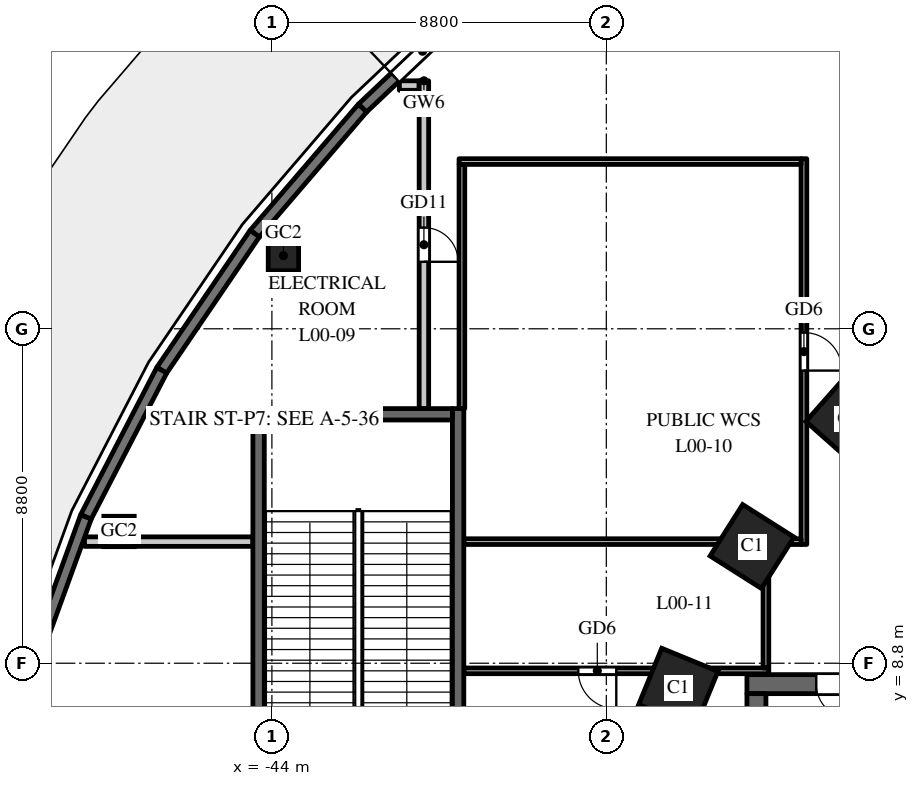
"""IFC4 building model, lengths in metres.
Left out: names, types, materials, properties, quantities, classifications, styles, units other than length and angle.
Written with IfcOpenShell. Run it as: python <this file> out.ifc"""

import sys

from ifc_helpers import new_model, si_unit, direction, frame, frame_2d, origin, origin_2d, place, context, subcontext, project, spatial, rectangle, hollow_rectangle, extrude, element, fill, save


model = new_model("IFC4")
c1 = context("Model", 3, precision=1e-05, world=origin(), true_north=direction((0.0, 1.0)))
c2 = subcontext(c1, "Body", "Model", "MODEL_VIEW")
j1 = project(units=[si_unit("LENGTHUNIT", "METRE"), si_unit("PLANEANGLEUNIT", "RADIAN")], contexts=[c1])
p1 = place(None, origin())
s1 = spatial("IfcSite", under=j1, at=p1, CompositionType="ELEMENT")
p2 = place(p1, origin())
s2 = spatial("IfcBuilding", under=s1, at=p2, CompositionType="ELEMENT")
p3 = place(p2, origin())
s3 = spatial("IfcBuildingStorey", under=s2, at=p3, CompositionType="ELEMENT", Elevation=0.0)
for number, where, z_axis, x_axis in (
    (1, (-28.819, 15.23, 0.0), (0.0, 0.0, 1.0), (-0.663, -0.749, 0.0)),
    (2, (-31.365, 11.871, 0.0), (0.0, 0.0, 1.0), (-0.535, -0.845, 0.0)),
    (3, (-33.305, 8.149, 0.0), (0.0, 0.0, 1.0), (-0.379, -0.925, 0.0)),
):
    element("IfcColumn", number, at=place(p3, frame(where, z_axis=z_axis, x_axis=x_axis)), inside=s3, PredefinedType="COLUMN", context=c2, shape_type="SweptSolid", body=[
        extrude(rectangle(XDim=1.6, YDim=1.6, at=origin_2d()), origin(), (0.0, 0.0, 1.0), 7.5),
    ])
p4 = place(p3, frame((-16.5, 8.25, 0.0), z_axis=(0.0, 0.0, 1.0), x_axis=(-1.0, 0.0, 0.0)))
e4 = element("IfcWall", 4, at=p4, inside=s3, PredefinedType="SHEAR", context=c2, shape_type="SweptSolid", body=[
    extrude(rectangle(XDim=15.0, YDim=0.5, at=frame_2d((7.5, 0.0))), origin(), (0.0, 0.0, 1.0), 7.25),
])
p5 = place(p4, frame((6.9, 0.0, 0.0)))
e5 = element("IfcOpeningElement", 5, at=p5, cuts=e4, PredefinedType="OPENING", context=c2, shape_type="SweptSolid", body=[
    extrude(rectangle(XDim=1.2, YDim=2.1, at=frame_2d((0.6, 1.05))), frame((0.0, 0.26, 0.0), z_axis=(0.0, -1.0, 0.0), x_axis=(1.0, 0.0, 0.0)), (0.0, 0.0, 1.0), 0.52),
])
p6 = place(p4, frame((5.3, 0.0, 0.0)))
e6 = element("IfcOpeningElement", 6, at=p6, cuts=e4, PredefinedType="OPENING", context=c2, shape_type="SweptSolid", body=[
    extrude(rectangle(XDim=1.1, YDim=2.1, at=frame_2d((0.55, 1.05))), frame((0.0, 0.26, 0.0), z_axis=(0.0, -1.0, 0.0), x_axis=(1.0, 0.0, 0.0)), (0.0, 0.0, 1.0), 0.52),
])
p7 = place(p4, frame((12.275, 0.0, 0.0)))
e7 = element("IfcOpeningElement", 7, at=p7, cuts=e4, PredefinedType="OPENING", context=c2, shape_type="SweptSolid", body=[
    extrude(rectangle(XDim=0.9, YDim=2.1, at=frame_2d((0.45, 1.05))), frame((0.0, 0.26, 0.0), z_axis=(0.0, -1.0, 0.0), x_axis=(1.0, 0.0, 0.0)), (0.0, 0.0, 1.0), 0.52),
])
p8 = place(p3, frame((-31.25, -8.0, 0.0), z_axis=(0.0, 0.0, 1.0), x_axis=(0.0, 1.0, 0.0)))
e8 = element("IfcWall", 8, at=p8, inside=s3, PredefinedType="SHEAR", context=c2, shape_type="SweptSolid", body=[
    extrude(rectangle(XDim=16.0, YDim=0.5, at=frame_2d((8.0, 0.0))), origin(), (0.0, 0.0, 1.0), 7.25),
])
for number, where, z_axis, x_axis in (
    (9, (-43.696, 19.525, 0.0), (0.0, 0.0, 1.0), (1.0, 0.0, 0.0)),
    (10, (-48.022, 12.267, 0.0), (0.0, 0.0, 1.0), (1.0, 0.0, 0.0)),
):
    element("IfcColumn", number, at=place(p3, frame(where, z_axis=z_axis, x_axis=x_axis)), inside=s3, PredefinedType="COLUMN", context=c2, shape_type="SweptSolid", body=[
        extrude(hollow_rectangle(XDim=0.8, YDim=0.8, WallThickness=0.04, at=origin_2d()), origin(), (0.0, 0.0, 1.0), 7.5),
    ])
p9 = place(p3, frame((-48.93, 12.0, 0.0), z_axis=(0.0, 0.0, 1.0), x_axis=(1.0, 0.0, 0.0)))
e11 = element("IfcWall", 11, at=p9, inside=s3, PredefinedType="PARTITIONING", context=c2, shape_type="SweptSolid", body=[
    extrude(rectangle(XDim=4.43, YDim=0.25, at=frame_2d((2.215, 0.0))), origin(), (0.0, 0.0, 1.0), 6.65),
])
p10 = place(p3, frame((-40.646, 24.0, 0.0), z_axis=(0.0, 0.0, 1.0), x_axis=(1.0, 0.0, 0.0)))
e12 = element("IfcWall", 12, at=p10, inside=s3, PredefinedType="PARTITIONING", context=c2, shape_type="SweptSolid", body=[
    extrude(rectangle(XDim=0.521, YDim=0.25, at=frame_2d((0.26, 0.0))), origin(), (0.0, 0.0, 1.0), 7.25),
])
p11 = place(p3, frame((-40.0, 24.125, 0.0), z_axis=(0.0, 0.0, 1.0), x_axis=(0.0, -1.0, 0.0)))
e13 = element("IfcWall", 13, at=p11, inside=s3, PredefinedType="PARTITIONING", context=c2, shape_type="SweptSolid", body=[
    extrude(rectangle(XDim=8.625, YDim=0.25, at=frame_2d((4.312, 0.0))), origin(), (0.0, 0.0, 1.0), 6.25),
])
p12 = place(p11, frame((3.863, 0.0, 0.0)))
e14 = element("IfcOpeningElement", 14, at=p12, cuts=e13, PredefinedType="OPENING", context=c2, shape_type="SweptSolid", body=[
    extrude(rectangle(XDim=0.9, YDim=2.1, at=frame_2d((0.45, 1.05))), frame((0.0, 0.135, 0.0), z_axis=(0.0, -1.0, 0.0), x_axis=(1.0, 0.0, 0.0)), (0.0, 0.0, 1.0), 0.27),
])
p13 = place(p3, frame((-31.065, 12.0, 0.0), z_axis=(0.0, 0.0, 1.0), x_axis=(-1.0, 0.0, 0.0)))
e15 = element("IfcWall", 15, at=p13, inside=s3, PredefinedType="PARTITIONING", context=c2, shape_type="SweptSolid", body=[
    extrude(rectangle(XDim=7.885, YDim=0.15, at=frame_2d((3.942, 0.0))), origin(), (0.0, 0.0, 1.0), 7.25),
])
p14 = place(p3, frame((-30.0, 22.075, 0.0), z_axis=(0.0, 0.0, 1.0), x_axis=(0.0, -1.0, 0.0)))
e16 = element("IfcWall", 16, at=p14, inside=s3, PredefinedType="PARTITIONING", context=c2, shape_type="SweptSolid", body=[
    extrude(rectangle(XDim=10.15, YDim=0.15, at=frame_2d((5.075, 0.0))), origin(), (0.0, 0.0, 1.0), 6.25),
])
p15 = place(p14, frame((4.575, 0.0, 0.0)))
e17 = element("IfcOpeningElement", 17, at=p15, cuts=e16, PredefinedType="OPENING", context=c2, shape_type="SweptSolid", body=[
    extrude(rectangle(XDim=1.0, YDim=2.1, at=frame_2d((0.5, 1.05))), frame((0.0, 0.085, 0.0), z_axis=(0.0, -1.0, 0.0), x_axis=(1.0, 0.0, 0.0)), (0.0, 0.0, 1.0), 0.17),
])
p16 = place(p3, frame((-30.075, 12.0, 0.0), z_axis=(0.0, 0.0, 1.0), x_axis=(-1.0, 0.0, 0.0)))
e18 = element("IfcWall", 18, at=p16, inside=s3, PredefinedType="PARTITIONING", context=c2, shape_type="SweptSolid", body=[
    extrude(rectangle(XDim=0.86, YDim=0.15, at=frame_2d((0.43, 0.0))), origin(), (0.0, 0.0, 1.0), 7.25),
])
p17 = place(p3, frame((-39.0, 15.5, 0.0), z_axis=(0.0, 0.0, 1.0), x_axis=(0.0, 1.0, 0.0)))
e19 = element("IfcWall", 19, at=p17, inside=s3, PredefinedType="PARTITIONING", context=c2, shape_type="SweptSolid", body=[
    extrude(rectangle(XDim=6.425, YDim=0.15, at=frame_2d((3.212, 0.0))), origin(), (0.0, 0.0, 1.0), 6.25),
])
p18 = place(p3, frame((-39.075, 22.0, 0.0), z_axis=(0.0, 0.0, 1.0), x_axis=(1.0, 0.0, 0.0)))
e20 = element("IfcWall", 20, at=p18, inside=s3, PredefinedType="PARTITIONING", context=c2, shape_type="SweptSolid", body=[
    extrude(rectangle(XDim=9.0, YDim=0.15, at=frame_2d((4.5, 0.0))), origin(), (0.0, 0.0, 1.0), 6.25),
])
p19 = place(p3, frame((-30.925, 8.6, 0.0), z_axis=(0.0, 0.0, 1.0), x_axis=(-1.0, 0.0, 0.0)))
e21 = element("IfcWall", 21, at=p19, inside=s3, PredefinedType="PARTITIONING", context=c2, shape_type="SweptSolid", body=[
    extrude(rectangle(XDim=8.025, YDim=0.15, at=frame_2d((4.012, 0.0))), origin(), (0.0, 0.0, 1.0), 6.35),
])
p20 = place(p19, frame((4.012, 0.0, 0.0)))
e22 = element("IfcOpeningElement", 22, at=p20, cuts=e21, PredefinedType="OPENING", context=c2, shape_type="SweptSolid", body=[
    extrude(rectangle(XDim=1.0, YDim=2.1, at=frame_2d((0.5, 1.05))), frame((0.0, 0.085, 0.0), z_axis=(0.0, -1.0, 0.0), x_axis=(1.0, 0.0, 0.0)), (0.0, 0.0, 1.0), 0.17),
])
p21 = place(p3, frame((-31.0, 11.925, 0.0), z_axis=(0.0, 0.0, 1.0), x_axis=(0.0, -1.0, 0.0)))
e23 = element("IfcWall", 23, at=p21, inside=s3, PredefinedType="PARTITIONING", context=c2, shape_type="SweptSolid", body=[
    extrude(rectangle(XDim=3.25, YDim=0.15, at=frame_2d((1.625, 0.0))), origin(), (0.0, 0.0, 1.0), 7.25),
])
p22 = place(p3, frame((-38.453, 26.401, 0.0), z_axis=(0.0, 0.0, 1.0), x_axis=(-0.72620446032, -0.687478786444, 0.0)))
e24 = element("IfcWall", 24, at=p22, inside=s3, PredefinedType="SOLIDWALL", context=c2, shape_type="SweptSolid", body=[
    extrude(rectangle(XDim=4.356, YDim=0.3, at=frame_2d((2.178, 0.0))), origin(), (0.0, 0.0, 1.0), 7.25),
])
p23 = place(p22, frame((1.178, 0.0, 0.0)))
e25 = element("IfcOpeningElement", 25, at=p23, cuts=e24, PredefinedType="OPENING", context=c2, shape_type="SweptSolid", body=[
    extrude(rectangle(XDim=2.0, YDim=2.4, at=frame_2d((1.0, 1.2))), frame((0.0, 0.16, 0.0), z_axis=(0.0, -1.0, 0.0), x_axis=(1.0, 0.0, 0.0)), (0.0, 0.0, 1.0), 0.32),
])
p24 = place(p3, frame((-41.617, 23.406, 0.0), z_axis=(0.0, 0.0, 1.0), x_axis=(-0.651387059497, -0.758745608699, 0.0)))
e26 = element("IfcWall", 26, at=p24, inside=s3, PredefinedType="SOLIDWALL", context=c2, shape_type="SweptSolid", body=[
    extrude(rectangle(XDim=4.353, YDim=0.3, at=frame_2d((2.176, 0.0))), origin(), (0.0, 0.0, 1.0), 7.25),
])
p25 = place(p24, frame((0.676, 0.0, 0.0)))
e27 = element("IfcOpeningElement", 27, at=p25, cuts=e26, PredefinedType="OPENING", context=c2, shape_type="SweptSolid", body=[
    extrude(rectangle(XDim=3.0, YDim=3.6, at=frame_2d((1.5, 1.8))), frame((0.0, 0.16, 0.0), z_axis=(0.0, -1.0, 0.0), x_axis=(1.0, 0.0, 0.0)), (0.0, 0.0, 1.0), 0.32),
])
p26 = place(p3, frame((-44.452, 20.104, 0.0), z_axis=(0.0, 0.0, 1.0), x_axis=(-0.562667738859, -0.82668314102, 0.0)))
e28 = element("IfcWall", 28, at=p26, inside=s3, PredefinedType="SOLIDWALL", context=c2, shape_type="SweptSolid", body=[
    extrude(rectangle(XDim=4.349, YDim=0.3, at=frame_2d((2.174, 0.0))), origin(), (0.0, 0.0, 1.0), 7.25),
])
p27 = place(p26, frame((0.674, 0.0, 0.0)))
e29 = element("IfcOpeningElement", 29, at=p27, cuts=e28, PredefinedType="OPENING", context=c2, shape_type="SweptSolid", body=[
    extrude(rectangle(XDim=3.0, YDim=3.6, at=frame_2d((1.5, 1.8))), frame((0.0, 0.16, 0.0), z_axis=(0.0, -1.0, 0.0), x_axis=(1.0, 0.0, 0.0)), (0.0, 0.0, 1.0), 0.32),
])
p28 = place(p3, frame((-46.899, 16.508, 0.0), z_axis=(0.0, 0.0, 1.0), x_axis=(-0.459242531468, -0.888310923771, 0.0)))
e30 = element("IfcWall", 30, at=p28, inside=s3, PredefinedType="SOLIDWALL", context=c2, shape_type="SweptSolid", body=[
    extrude(rectangle(XDim=4.345, YDim=0.3, at=frame_2d((2.172, 0.0))), origin(), (0.0, 0.0, 1.0), 7.25),
])
p29 = place(p28, frame((0.673, 0.0, 0.0)))
e31 = element("IfcOpeningElement", 31, at=p29, cuts=e30, PredefinedType="OPENING", context=c2, shape_type="SweptSolid", body=[
    extrude(rectangle(XDim=3.0, YDim=3.6, at=frame_2d((1.5, 1.8))), frame((0.0, 0.16, 0.0), z_axis=(0.0, -1.0, 0.0), x_axis=(1.0, 0.0, 0.0)), (0.0, 0.0, 1.0), 0.32),
])
p30 = place(p3, frame((-48.894, 12.649, 0.0), z_axis=(0.0, 0.0, 1.0), x_axis=(-0.341286990045, -0.939959142956, 0.0)))
e32 = element("IfcWall", 32, at=p30, inside=s3, PredefinedType="SOLIDWALL", context=c2, shape_type="SweptSolid", body=[
    extrude(rectangle(XDim=4.342, YDim=0.3, at=frame_2d((2.171, 0.0))), origin(), (0.0, 0.0, 1.0), 7.25),
])
p31 = place(p30, frame((0.851, 0.0, 0.0)))
e33 = element("IfcOpeningElement", 33, at=p31, cuts=e32, PredefinedType="OPENING", context=c2, shape_type="SweptSolid", body=[
    extrude(rectangle(XDim=3.0, YDim=3.6, at=frame_2d((1.5, 1.8))), frame((0.0, 0.16, 0.0), z_axis=(0.0, -1.0, 0.0), x_axis=(1.0, 0.0, 0.0)), (0.0, 0.0, 1.0), 0.32),
])
for number, where, z_axis, x_axis in (
    (34, (-44.35, 4.5, 0.0), (0.0, 0.0, 1.0), (0.0, 1.0, 0.0)),
    (35, (-39.1, 4.5, 0.0), (0.0, 0.0, 1.0), (0.0, 1.0, 0.0)),
):
    element("IfcWall", number, at=place(p3, frame(where, z_axis=z_axis, x_axis=x_axis)), inside=s3, PredefinedType="SHEAR", context=c2, shape_type="SweptSolid", body=[
        extrude(rectangle(XDim=11.0, YDim=0.3, at=frame_2d((5.5, 0.0))), origin(), (0.0, 0.0, 1.0), 7.25),
    ])
p32 = place(p3, frame((-44.2, 15.35, 0.0), z_axis=(0.0, 0.0, 1.0), x_axis=(1.0, 0.0, 0.0)))
e36 = element("IfcWall", 36, at=p32, inside=s3, PredefinedType="SHEAR", context=c2, shape_type="SweptSolid", body=[
    extrude(rectangle(XDim=4.95, YDim=0.3, at=frame_2d((2.475, 0.0))), origin(), (0.0, 0.0, 1.0), 7.25),
])
p33 = place(p7, origin())
e37 = element("IfcDoor", 37, at=p33, inside=s3, OperationType="SINGLE_SWING_RIGHT", PredefinedType="DOOR", context=c2, shape_type="SweptSolid", body=[
    extrude(rectangle(XDim=0.9, YDim=2.1, at=frame_2d((0.45, 1.05))), frame((0.0, 0.025, 0.0), z_axis=(0.0, -1.0, 0.0), x_axis=(1.0, 0.0, 0.0)), (0.0, 0.0, 1.0), 0.05),
])
fill(e7, e37)
p34 = place(p12, origin())
e38 = element("IfcDoor", 38, at=p34, inside=s3, OperationType="SINGLE_SWING_RIGHT", PredefinedType="DOOR", context=c2, shape_type="SweptSolid", body=[
    extrude(rectangle(XDim=0.9, YDim=2.1, at=frame_2d((0.45, 1.05))), frame((0.0, 0.025, 0.0), z_axis=(0.0, -1.0, 0.0), x_axis=(1.0, 0.0, 0.0)), (0.0, 0.0, 1.0), 0.05),
])
fill(e14, e38)
p35 = place(p15, origin())
e39 = element("IfcDoor", 39, at=p35, inside=s3, OperationType="SINGLE_SWING_RIGHT", PredefinedType="DOOR", context=c2, shape_type="SweptSolid", body=[
    extrude(rectangle(XDim=1.0, YDim=2.1, at=frame_2d((0.5, 1.05))), frame((0.0, 0.025, 0.0), z_axis=(0.0, -1.0, 0.0), x_axis=(1.0, 0.0, 0.0)), (0.0, 0.0, 1.0), 0.05),
])
fill(e17, e39)
p36 = place(p20, origin())
e40 = element("IfcDoor", 40, at=p36, inside=s3, OperationType="SINGLE_SWING_LEFT", PredefinedType="DOOR", context=c2, shape_type="SweptSolid", body=[
    extrude(rectangle(XDim=1.0, YDim=2.1, at=frame_2d((0.5, 1.05))), frame((0.0, 0.025, 0.0), z_axis=(0.0, -1.0, 0.0), x_axis=(1.0, 0.0, 0.0)), (0.0, 0.0, 1.0), 0.05),
])
fill(e22, e40)
p37 = place(p23, frame((2.0, 0.0, 0.0), z_axis=(0.0, 0.0, 1.0), x_axis=(-1.0, 0.0, 0.0)))
e41 = element("IfcDoor", 41, at=p37, inside=s3, OperationType="DOUBLE_DOOR_SINGLE_SWING", PredefinedType="DOOR", context=c2, shape_type="SweptSolid", body=[
    extrude(rectangle(XDim=2.0, YDim=2.4, at=frame_2d((1.0, 1.2))), frame((0.0, 0.025, 0.0), z_axis=(0.0, -1.0, 0.0), x_axis=(1.0, 0.0, 0.0)), (0.0, 0.0, 1.0), 0.05),
])
fill(e25, e41)
p38 = place(p25, origin())
e42 = element("IfcWindow", 42, at=p38, inside=s3, PartitioningType="SINGLE_PANEL", PredefinedType="WINDOW", context=c2, shape_type="SweptSolid", body=[
    extrude(rectangle(XDim=3.0, YDim=3.6, at=frame_2d((1.5, 1.8))), frame((0.0, 0.03, 0.0), z_axis=(0.0, -1.0, 0.0), x_axis=(1.0, 0.0, 0.0)), (0.0, 0.0, 1.0), 0.06),
])
fill(e27, e42)
p39 = place(p27, origin())
e43 = element("IfcWindow", 43, at=p39, inside=s3, PartitioningType="SINGLE_PANEL", PredefinedType="WINDOW", context=c2, shape_type="SweptSolid", body=[
    extrude(rectangle(XDim=3.0, YDim=3.6, at=frame_2d((1.5, 1.8))), frame((0.0, 0.03, 0.0), z_axis=(0.0, -1.0, 0.0), x_axis=(1.0, 0.0, 0.0)), (0.0, 0.0, 1.0), 0.06),
])
fill(e29, e43)
p40 = place(p29, origin())
e44 = element("IfcWindow", 44, at=p40, inside=s3, PartitioningType="SINGLE_PANEL", PredefinedType="WINDOW", context=c2, shape_type="SweptSolid", body=[
    extrude(rectangle(XDim=3.0, YDim=3.6, at=frame_2d((1.5, 1.8))), frame((0.0, 0.03, 0.0), z_axis=(0.0, -1.0, 0.0), x_axis=(1.0, 0.0, 0.0)), (0.0, 0.0, 1.0), 0.06),
])
fill(e31, e44)
p41 = place(p31, origin())
e45 = element("IfcWindow", 45, at=p41, inside=s3, PartitioningType="SINGLE_PANEL", PredefinedType="WINDOW", context=c2, shape_type="SweptSolid", body=[
    extrude(rectangle(XDim=3.0, YDim=3.6, at=frame_2d((1.5, 1.8))), frame((0.0, 0.03, 0.0), z_axis=(0.0, -1.0, 0.0), x_axis=(1.0, 0.0, 0.0)), (0.0, 0.0, 1.0), 0.06),
])
fill(e33, e45)
save(model, sys.argv[1])
